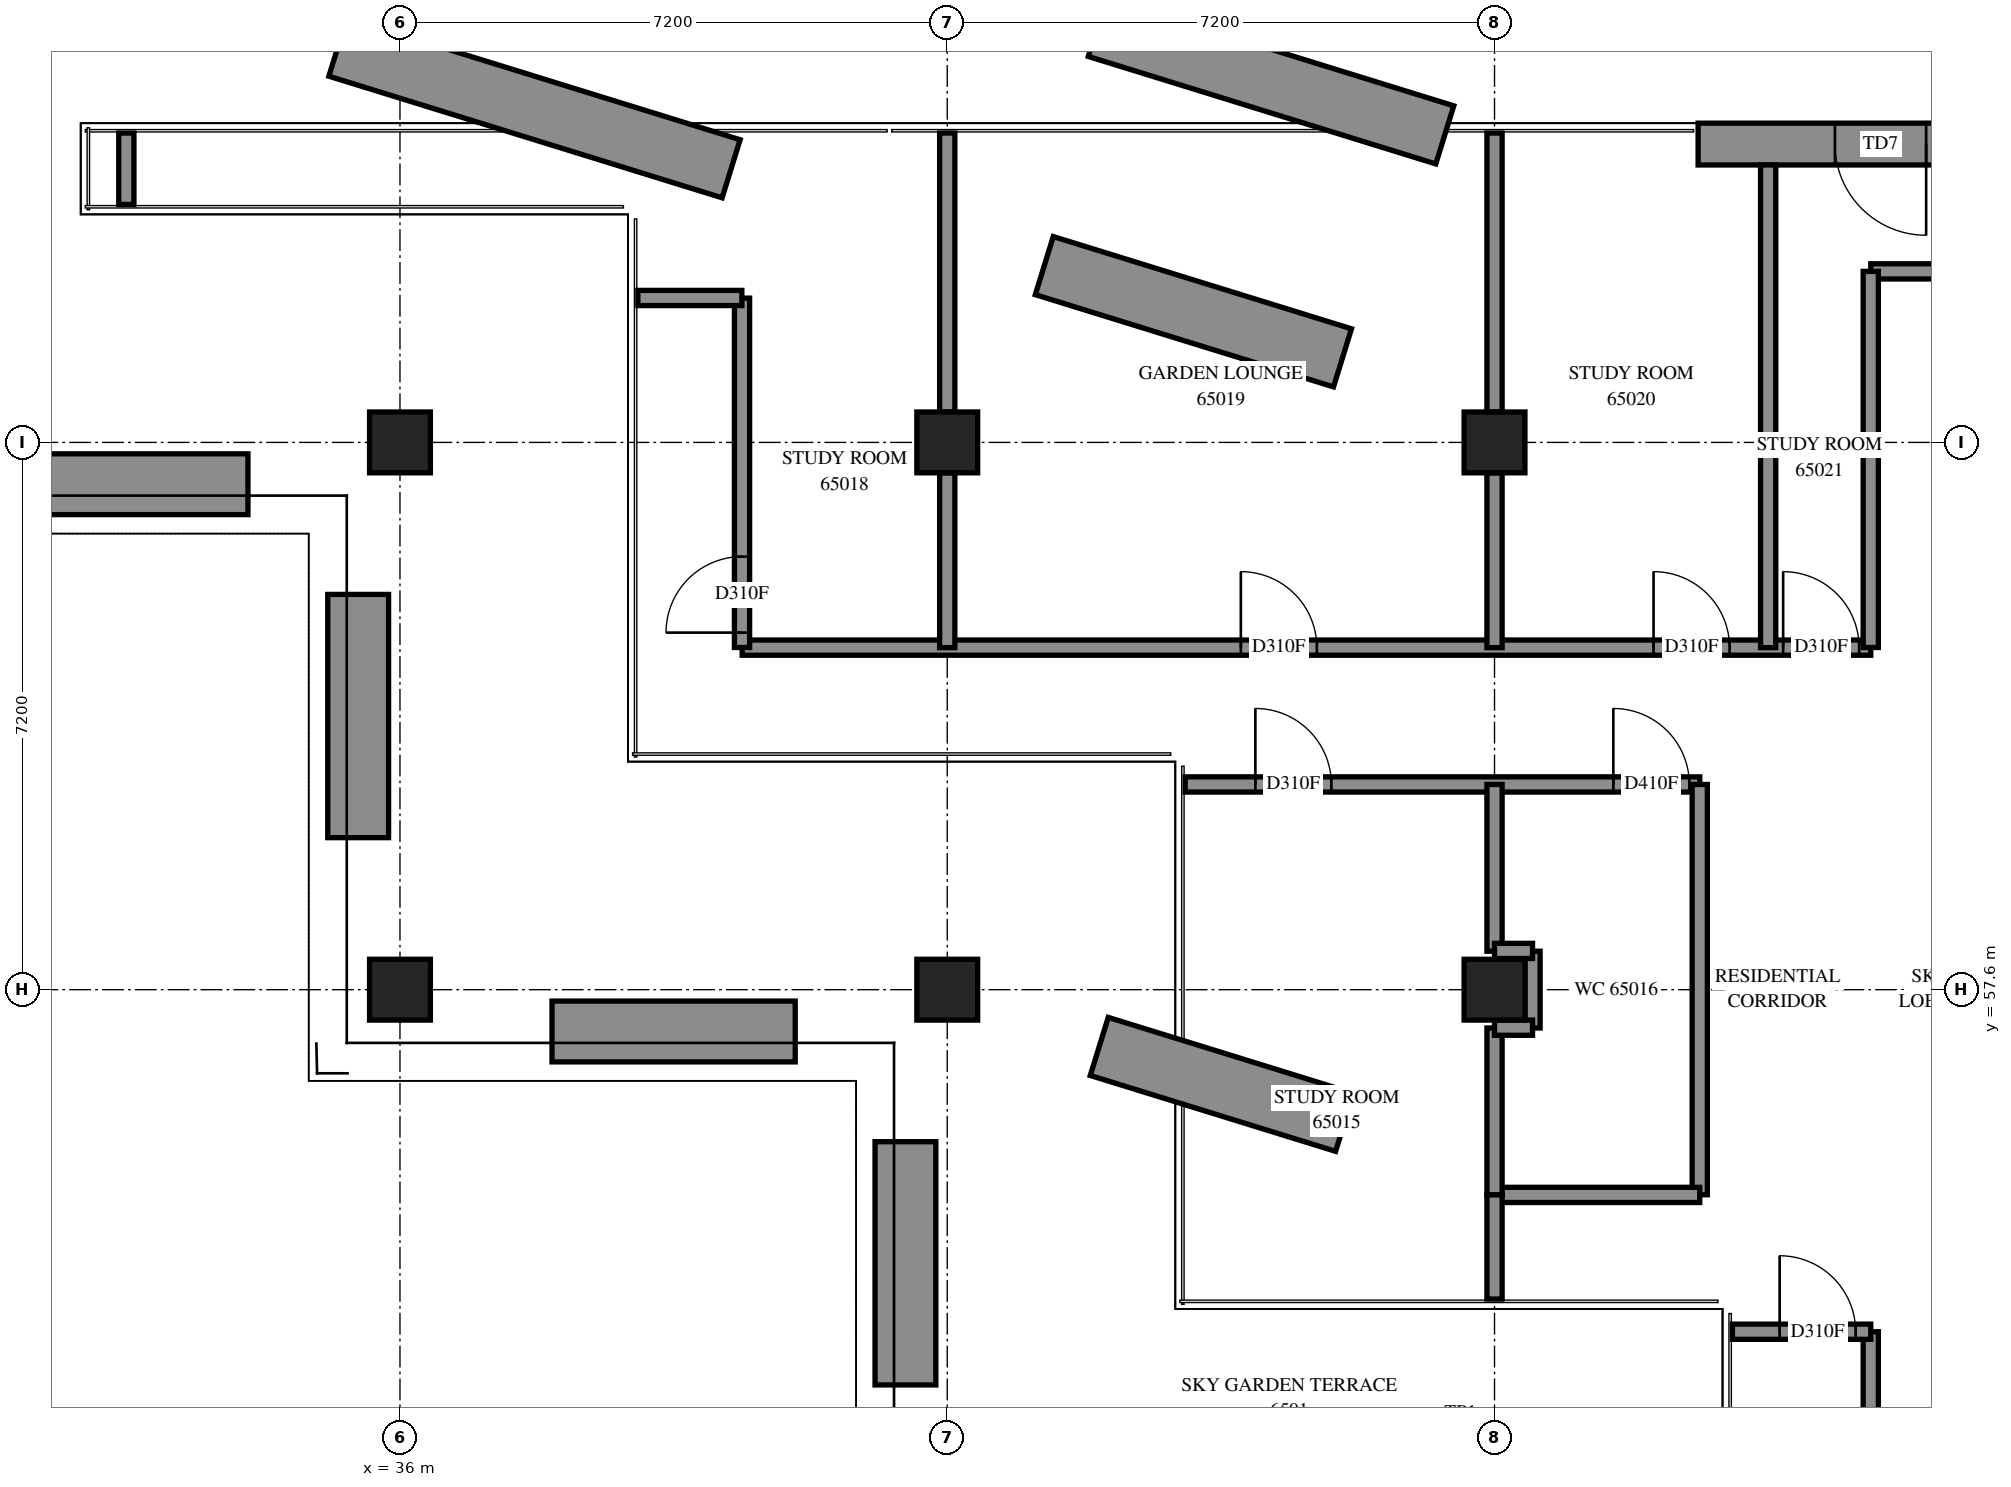
"""IFC4 building model, lengths in metres.
Left out: names, types, materials, properties, quantities, classifications, styles, units other than length and angle.
Written with IfcOpenShell. Run it as: python <this file> out.ifc"""

import sys

from ifc_helpers import new_model, si_unit, direction, frame, frame_2d, origin, origin_2d, place, context, subcontext, project, spatial, polyline, rectangle, outline, extrude, element, fill, save


model = new_model("IFC4")
c1 = context("Model", 3, precision=1e-05, world=origin(), true_north=direction((0.0, 1.0)))
c2 = subcontext(c1, "Body", "Model", "MODEL_VIEW")
j1 = project(units=[si_unit("LENGTHUNIT", "METRE"), si_unit("PLANEANGLEUNIT", "RADIAN")], contexts=[c1])
p1 = place(None, origin())
s1 = spatial("IfcSite", under=j1, at=p1, CompositionType="ELEMENT")
p2 = place(p1, origin())
s2 = spatial("IfcBuilding", under=s1, at=p2, CompositionType="ELEMENT")
p3 = place(p2, frame((0.0, 0.0, 239.6)))
s3 = spatial("IfcBuildingStorey", under=s2, at=p3, CompositionType="ELEMENT", Elevation=239.6)
for number, where, z_axis, x_axis in (
    (1, (36.0, 57.6, 0.0), (0.0, 0.0, 1.0), (1.0, 0.0, 0.0)),
    (2, (36.0, 64.8, 0.0), (0.0, 0.0, 1.0), (1.0, 0.0, 0.0)),
    (3, (43.2, 57.6, 0.0), (0.0, 0.0, 1.0), (1.0, 0.0, 0.0)),
    (4, (43.2, 64.8, 0.0), (0.0, 0.0, 1.0), (1.0, 0.0, 0.0)),
    (5, (50.4, 57.6, 0.0), (0.0, 0.0, 1.0), (1.0, 0.0, 0.0)),
    (6, (50.4, 64.8, 0.0), (0.0, 0.0, 1.0), (1.0, 0.0, 0.0)),
):
    element("IfcColumn", number, at=place(p3, frame(where, z_axis=z_axis, x_axis=x_axis)), inside=s3, PredefinedType="COLUMN", context=c2, shape_type="SweptSolid", body=[
        extrude(rectangle(XDim=0.8, YDim=0.8, at=origin_2d()), origin(), (0.0, 0.0, 1.0), 3.9),
    ])
p4 = place(p3, frame((56.678, 68.725, 0.0), z_axis=(0.0, 0.0, 1.0), x_axis=(-1.0, 0.0, 0.0)))
e7 = element("IfcWall", 7, at=p4, inside=s3, PredefinedType="SOLIDWALL", context=c2, shape_type="SweptSolid", body=[
    extrude(rectangle(XDim=3.6, YDim=0.55, at=frame_2d((1.8, 0.0))), origin(), (0.0, 0.0, 1.0), 3.9),
])
p5 = place(p4, frame((0.6, 0.0, 0.0)))
e8 = element("IfcOpeningElement", 8, at=p5, cuts=e7, PredefinedType="OPENING", context=c2, shape_type="SweptSolid", body=[
    extrude(rectangle(XDim=1.2, YDim=2.4, at=frame_2d((0.6, 1.2))), frame((0.0, 0.285, 0.0), z_axis=(0.0, -1.0, 0.0), x_axis=(1.0, 0.0, 0.0)), (0.0, 0.0, 1.0), 0.57),
])
for number, where, z_axis, x_axis in (
    (9, (30.8, 64.25, 0.0), (0.0, 0.0, 1.0), (1.0, 0.0, 0.0)),
    (10, (35.45, 62.8, 0.0), (0.0, 0.0, 1.0), (0.0, -1.0, 0.0)),
    (11, (38.0, 57.05, 0.0), (0.0, 0.0, 1.0), (1.0, 0.0, 0.0)),
    (12, (42.65, 55.6, 0.0), (0.0, 0.0, 1.0), (0.0, -1.0, 0.0)),
):
    element("IfcWall", number, at=place(p3, frame(where, z_axis=z_axis, x_axis=x_axis)), inside=s3, PredefinedType="SOLIDWALL", context=c2, shape_type="SweptSolid", body=[
        extrude(rectangle(XDim=3.2, YDim=0.8, at=frame_2d((1.6, 0.0))), origin(), (0.0, 0.0, 1.0), 0.65),
    ])
p6 = place(p3, frame((49.746, 68.846, 0.0), z_axis=(0.0, 0.0, 1.0), x_axis=(-0.9553559962, 0.2954571382, 0.0)))
e13 = element("IfcWall", 13, at=p6, inside=s3, PredefinedType="SOLIDWALL", context=c2, shape_type="SweptSolid", body=[
    extrude(rectangle(XDim=4.785, YDim=0.8, at=frame_2d((2.393, 0.0))), origin(), (0.0, 0.0, 1.0), 0.65),
])
p7 = place(p3, frame((48.4, 65.912, 0.0), z_axis=(0.0, 0.0, 1.0), x_axis=(-0.9553584107, 0.2954493308, 0.0)))
e14 = element("IfcWall", 14, at=p7, inside=s3, PredefinedType="SOLIDWALL", context=c2, shape_type="SweptSolid", body=[
    extrude(rectangle(XDim=4.107, YDim=0.8, at=frame_2d((2.053, 0.0))), origin(), (0.0, 0.0, 1.0), 0.65),
])
p8 = place(p3, frame((40.356, 68.4, 0.0), z_axis=(0.0, 0.0, 1.0), x_axis=(-0.9553596268, 0.2954453985, 0.0)))
e15 = element("IfcWall", 15, at=p8, inside=s3, PredefinedType="SOLIDWALL", context=c2, shape_type="SweptSolid", body=[
    extrude(rectangle(XDim=5.416, YDim=0.8, at=frame_2d((2.708, 0.0))), origin(), (0.0, 0.0, 1.0), 0.65),
])
p9 = place(p3, frame((55.35, 67.05, 0.0), z_axis=(0.0, 0.0, 1.0), x_axis=(1.0, 0.0, 0.0)))
e16 = element("IfcWall", 16, at=p9, inside=s3, PredefinedType="PARTITIONING", context=c2, shape_type="SweptSolid", body=[
    extrude(rectangle(XDim=18.9, YDim=0.2, at=frame_2d((9.45, 0.0))), origin(), (0.0, 0.0, 1.0), 3.9),
])
p10 = place(p9, frame((9.733, 0.0, 0.0)))
e17 = element("IfcOpeningElement", 17, at=p10, cuts=e16, PredefinedType="OPENING", context=c2, shape_type="SweptSolid", body=[
    extrude(rectangle(XDim=1.0, YDim=2.1, at=frame_2d((0.5, 1.05))), frame((0.0, 0.11, 0.0), z_axis=(0.0, -1.0, 0.0), x_axis=(1.0, 0.0, 0.0)), (0.0, 0.0, 1.0), 0.22),
])
p11 = place(p3, frame((40.502, 62.1, 0.0), z_axis=(0.0, 0.0, 1.0), x_axis=(1.0, 0.0, 0.0)))
e18 = element("IfcWall", 18, at=p11, inside=s3, PredefinedType="PARTITIONING", context=c2, shape_type="SweptSolid", body=[
    extrude(rectangle(XDim=14.848, YDim=0.2, at=frame_2d((7.424, 0.0))), origin(), (0.0, 0.0, 1.0), 3.9),
])
p12 = place(p11, frame((6.561, 0.0, 0.0)))
e19 = element("IfcOpeningElement", 19, at=p12, cuts=e18, PredefinedType="OPENING", context=c2, shape_type="SweptSolid", body=[
    extrude(rectangle(XDim=1.0, YDim=2.1, at=frame_2d((0.5, 1.05))), frame((0.0, 0.11, 0.0), z_axis=(0.0, -1.0, 0.0), x_axis=(1.0, 0.0, 0.0)), (0.0, 0.0, 1.0), 0.22),
])
p13 = place(p11, frame((11.991, 0.0, 0.0)))
e20 = element("IfcOpeningElement", 20, at=p13, cuts=e18, PredefinedType="OPENING", context=c2, shape_type="SweptSolid", body=[
    extrude(rectangle(XDim=1.0, YDim=2.1, at=frame_2d((0.5, 1.05))), frame((0.0, 0.11, 0.0), z_axis=(0.0, -1.0, 0.0), x_axis=(1.0, 0.0, 0.0)), (0.0, 0.0, 1.0), 0.22),
])
p14 = place(p11, frame((13.695, 0.0, 0.0)))
e21 = element("IfcOpeningElement", 21, at=p14, cuts=e18, PredefinedType="OPENING", context=c2, shape_type="SweptSolid", body=[
    extrude(rectangle(XDim=1.0, YDim=2.1, at=frame_2d((0.5, 1.05))), frame((0.0, 0.11, 0.0), z_axis=(0.0, -1.0, 0.0), x_axis=(1.0, 0.0, 0.0)), (0.0, 0.0, 1.0), 0.22),
])
p15 = place(p3, frame((46.33, 60.3, 0.0), z_axis=(0.0, 0.0, 1.0), x_axis=(1.0, 0.0, 0.0)))
e22 = element("IfcWall", 22, at=p15, inside=s3, PredefinedType="PARTITIONING", context=c2, shape_type="SweptSolid", body=[
    extrude(rectangle(XDim=6.77, YDim=0.2, at=frame_2d((3.385, 0.0))), origin(), (0.0, 0.0, 1.0), 3.9),
])
p16 = place(p15, frame((0.924, 0.0, 0.0)))
e23 = element("IfcOpeningElement", 23, at=p16, cuts=e22, PredefinedType="OPENING", context=c2, shape_type="SweptSolid", body=[
    extrude(rectangle(XDim=1.0, YDim=2.1, at=frame_2d((0.5, 1.05))), frame((0.0, 0.11, 0.0), z_axis=(0.0, -1.0, 0.0), x_axis=(1.0, 0.0, 0.0)), (0.0, 0.0, 1.0), 0.22),
])
p17 = place(p15, frame((5.633, 0.0, 0.0)))
e24 = element("IfcOpeningElement", 24, at=p17, cuts=e22, PredefinedType="OPENING", context=c2, shape_type="SweptSolid", body=[
    extrude(rectangle(XDim=1.0, YDim=2.1, at=frame_2d((0.5, 1.05))), frame((0.0, 0.11, 0.0), z_axis=(0.0, -1.0, 0.0), x_axis=(1.0, 0.0, 0.0)), (0.0, 0.0, 1.0), 0.22),
])
p18 = place(p3, frame((54.0, 62.1, 0.0), z_axis=(0.0, 0.0, 1.0), x_axis=(0.0, 1.0, 0.0)))
e25 = element("IfcWall", 25, at=p18, inside=s3, PredefinedType="PARTITIONING", context=c2, shape_type="SweptSolid", body=[
    extrude(rectangle(XDim=6.35, YDim=0.2, at=frame_2d((3.175, 0.0))), origin(), (0.0, 0.0, 1.0), 3.9),
])
p19 = place(p3, frame((53.1, 54.902, 0.0), z_axis=(0.0, 0.0, 1.0), x_axis=(0.0, 1.0, 0.0)))
e26 = element("IfcWall", 26, at=p19, inside=s3, PredefinedType="PARTITIONING", context=c2, shape_type="SweptSolid", body=[
    extrude(rectangle(XDim=5.398, YDim=0.2, at=frame_2d((2.699, 0.0))), origin(), (0.0, 0.0, 1.0), 3.9),
])
p20 = place(p3, frame((55.35, 48.15, 0.0), z_axis=(0.0, 0.0, 1.0), x_axis=(0.0, 1.0, 0.0)))
e27 = element("IfcWall", 27, at=p20, inside=s3, PredefinedType="PARTITIONING", context=c2, shape_type="SweptSolid", body=[
    extrude(rectangle(XDim=4.95, YDim=0.2, at=frame_2d((2.475, 0.0))), origin(), (0.0, 0.0, 1.0), 3.9),
])
p21 = place(p3, frame((55.35, 62.102, 0.0), z_axis=(0.0, 0.0, 1.0), x_axis=(0.0, 1.0, 0.0)))
e28 = element("IfcWall", 28, at=p21, inside=s3, PredefinedType="PARTITIONING", context=c2, shape_type="SweptSolid", body=[
    extrude(rectangle(XDim=4.948, YDim=0.2, at=frame_2d((2.474, 0.0))), origin(), (0.0, 0.0, 1.0), 3.9),
])
p22 = place(p3, frame((40.5, 62.102, 0.0), z_axis=(0.0, 0.0, 1.0), x_axis=(0.0, 1.0, 0.0)))
e29 = element("IfcWall", 29, at=p22, inside=s3, PredefinedType="PARTITIONING", context=c2, shape_type="SweptSolid", body=[
    extrude(rectangle(XDim=4.596, YDim=0.2, at=frame_2d((2.298, 0.0))), origin(), (0.0, 0.0, 1.0), 3.9),
])
p23 = place(p22, frame((0.196, 0.0, 0.0)))
e30 = element("IfcOpeningElement", 30, at=p23, cuts=e29, PredefinedType="OPENING", context=c2, shape_type="SweptSolid", body=[
    extrude(rectangle(XDim=1.0, YDim=2.1, at=frame_2d((0.5, 1.05))), frame((0.0, 0.11, 0.0), z_axis=(0.0, -1.0, 0.0), x_axis=(1.0, 0.0, 0.0)), (0.0, 0.0, 1.0), 0.22),
])
for number, where, z_axis, x_axis in (
    (31, (43.2, 65.2, 0.0), (0.0, 0.0, 1.0), (0.0, 1.0, 0.0)),
    (32, (50.4, 65.2, 0.0), (0.0, 0.0, 1.0), (0.0, 1.0, 0.0)),
):
    element("IfcWall", number, at=place(p3, frame(where, z_axis=z_axis, x_axis=x_axis)), inside=s3, PredefinedType="PARTITIONING", context=c2, shape_type="SweptSolid", body=[
        extrude(rectangle(XDim=3.67, YDim=0.2, at=frame_2d((1.835, 0.0))), origin(), (0.0, 0.0, 1.0), 3.9),
    ])
p24 = place(p3, frame((50.4, 54.9, 0.0), z_axis=(0.0, 0.0, 1.0), x_axis=(1.0, 0.0, 0.0)))
e33 = element("IfcWall", 33, at=p24, inside=s3, PredefinedType="PARTITIONING", context=c2, shape_type="SweptSolid", body=[
    extrude(rectangle(XDim=2.7, YDim=0.2, at=frame_2d((1.35, 0.0))), origin(), (0.0, 0.0, 1.0), 3.9),
])
for number, where, z_axis, x_axis in (
    (34, (43.2, 62.1, 0.0), (0.0, 0.0, 1.0), (0.0, 1.0, 0.0)),
    (35, (50.4, 62.1, 0.0), (0.0, 0.0, 1.0), (0.0, 1.0, 0.0)),
):
    element("IfcWall", number, at=place(p3, frame(where, z_axis=z_axis, x_axis=x_axis)), inside=s3, PredefinedType="PARTITIONING", context=c2, shape_type="SweptSolid", body=[
        extrude(rectangle(XDim=2.3, YDim=0.2, at=frame_2d((1.15, 0.0))), origin(), (0.0, 0.0, 1.0), 3.9),
    ])
p25 = place(p3, frame((50.4, 54.9, 0.0), z_axis=(0.0, 0.0, 1.0), x_axis=(0.0, 1.0, 0.0)))
e36 = element("IfcWall", 36, at=p25, inside=s3, PredefinedType="PARTITIONING", context=c2, shape_type="SweptSolid", body=[
    extrude(rectangle(XDim=2.196, YDim=0.2, at=frame_2d((1.098, 0.0))), origin(), (0.0, 0.0, 1.0), 3.9),
])
p26 = place(p3, frame((50.4, 58.106, 0.0), z_axis=(0.0, 0.0, 1.0), x_axis=(0.0, 1.0, 0.0)))
e37 = element("IfcWall", 37, at=p26, inside=s3, PredefinedType="PARTITIONING", context=c2, shape_type="SweptSolid", body=[
    extrude(rectangle(XDim=2.194, YDim=0.2, at=frame_2d((1.097, 0.0))), origin(), (0.0, 0.0, 1.0), 3.9),
])
p27 = place(p3, frame((53.53, 53.1, 0.0), z_axis=(0.0, 0.0, 1.0), x_axis=(1.0, 0.0, 0.0)))
e38 = element("IfcWall", 38, at=p27, inside=s3, PredefinedType="PARTITIONING", context=c2, shape_type="SweptSolid", body=[
    extrude(rectangle(XDim=1.82, YDim=0.2, at=frame_2d((0.91, 0.0))), origin(), (0.0, 0.0, 1.0), 3.9),
])
p28 = place(p27, frame((0.621, 0.0, 0.0)))
e39 = element("IfcOpeningElement", 39, at=p28, cuts=e38, PredefinedType="OPENING", context=c2, shape_type="SweptSolid", body=[
    extrude(rectangle(XDim=1.0, YDim=2.1, at=frame_2d((0.5, 1.05))), frame((0.0, 0.11, 0.0), z_axis=(0.0, -1.0, 0.0), x_axis=(1.0, 0.0, 0.0)), (0.0, 0.0, 1.0), 0.22),
])
p29 = place(p3, frame((50.4, 53.53, 0.0), z_axis=(0.0, 0.0, 1.0), x_axis=(0.0, 1.0, 0.0)))
e40 = element("IfcWall", 40, at=p29, inside=s3, PredefinedType="PARTITIONING", context=c2, shape_type="SweptSolid", body=[
    extrude(rectangle(XDim=1.37, YDim=0.2, at=frame_2d((0.685, 0.0))), origin(), (0.0, 0.0, 1.0), 3.9),
])
p30 = place(p3, frame((39.13, 66.7, 0.0), z_axis=(0.0, 0.0, 1.0), x_axis=(1.0, 0.0, 0.0)))
e41 = element("IfcWall", 41, at=p30, inside=s3, PredefinedType="PARTITIONING", context=c2, shape_type="SweptSolid", body=[
    extrude(rectangle(XDim=1.368, YDim=0.2, at=frame_2d((0.684, 0.0))), origin(), (0.0, 0.0, 1.0), 3.9),
])
p31 = place(p3, frame((50.9, 57.096, 0.0), z_axis=(0.0, 0.0, 1.0), x_axis=(0.0, 1.0, 0.0)))
e42 = element("IfcWall", 42, at=p31, inside=s3, PredefinedType="PARTITIONING", context=c2, shape_type="SweptSolid", body=[
    extrude(rectangle(XDim=1.01, YDim=0.2, at=frame_2d((0.505, 0.0))), origin(), (0.0, 0.0, 1.0), 3.9),
])
p32 = place(p3, frame((32.4, 67.93, 0.0), z_axis=(0.0, 0.0, 1.0), x_axis=(0.0, 1.0, 0.0)))
e43 = element("IfcWall", 43, at=p32, inside=s3, PredefinedType="PARTITIONING", context=c2, shape_type="SweptSolid", body=[
    extrude(rectangle(XDim=0.94, YDim=0.2, at=frame_2d((0.47, 0.0))), origin(), (0.0, 0.0, 1.0), 3.9),
])
for number, where, z_axis, x_axis in (
    (44, (50.4, 58.11, 0.0), (0.0, 0.0, 1.0), (1.0, 0.0, 0.0)),
    (45, (50.4, 57.1, 0.0), (0.0, 0.0, 1.0), (1.0, 0.0, 0.0)),
):
    element("IfcWall", number, at=place(p3, frame(where, z_axis=z_axis, x_axis=x_axis)), inside=s3, PredefinedType="PARTITIONING", context=c2, shape_type="SweptSolid", body=[
        extrude(rectangle(XDim=0.5, YDim=0.2, at=frame_2d((0.25, 0.0))), origin(), (0.0, 0.0, 1.0), 3.9),
    ])
p33 = place(p3, frame((48.427, 55.855, 0.0), z_axis=(0.0, 0.0, 1.0), x_axis=(-0.9553575309, 0.2954521756, 0.0)))
e46 = element("IfcWall", 46, at=p33, inside=s3, PredefinedType="SOLIDWALL", context=c2, shape_type="SweptSolid", body=[
    extrude(outline(polyline([(0.0, -0.4), (3.378, -0.4), (3.378, 0.4), (0.0, 0.4), (0.0, -0.4)])), origin(), (0.0, 0.0, 1.0), 0.65),
])
p34 = place(p5, origin())
e47 = element("IfcDoor", 47, at=p34, inside=s3, OperationType="SINGLE_SWING_LEFT", PredefinedType="DOOR", context=c2, shape_type="SweptSolid", body=[
    extrude(rectangle(XDim=1.2, YDim=2.4, at=frame_2d((0.6, 1.2))), frame((0.0, 0.025, 0.0), z_axis=(0.0, -1.0, 0.0), x_axis=(1.0, 0.0, 0.0)), (0.0, 0.0, 1.0), 0.05),
])
fill(e8, e47)
p35 = place(p28, origin())
e48 = element("IfcDoor", 48, at=p35, inside=s3, OperationType="SINGLE_SWING_RIGHT", PredefinedType="DOOR", context=c2, shape_type="SweptSolid", body=[
    extrude(rectangle(XDim=1.0, YDim=2.1, at=frame_2d((0.5, 1.05))), frame((0.0, 0.025, 0.0), z_axis=(0.0, -1.0, 0.0), x_axis=(1.0, 0.0, 0.0)), (0.0, 0.0, 1.0), 0.05),
])
fill(e39, e48)
p36 = place(p16, origin())
e49 = element("IfcDoor", 49, at=p36, inside=s3, OperationType="SINGLE_SWING_RIGHT", PredefinedType="DOOR", context=c2, shape_type="SweptSolid", body=[
    extrude(rectangle(XDim=1.0, YDim=2.1, at=frame_2d((0.5, 1.05))), frame((0.0, 0.025, 0.0), z_axis=(0.0, -1.0, 0.0), x_axis=(1.0, 0.0, 0.0)), (0.0, 0.0, 1.0), 0.05),
])
fill(e23, e49)
p37 = place(p17, origin())
e50 = element("IfcDoor", 50, at=p37, inside=s3, OperationType="SINGLE_SWING_LEFT", PredefinedType="DOOR", context=c2, shape_type="SweptSolid", body=[
    extrude(rectangle(XDim=1.0, YDim=2.1, at=frame_2d((0.5, 1.05))), frame((0.0, 0.025, 0.0), z_axis=(0.0, -1.0, 0.0), x_axis=(1.0, 0.0, 0.0)), (0.0, 0.0, 1.0), 0.05),
])
fill(e24, e50)
p38 = place(p23, origin())
e51 = element("IfcDoor", 51, at=p38, inside=s3, OperationType="SINGLE_SWING_LEFT", PredefinedType="DOOR", context=c2, shape_type="SweptSolid", body=[
    extrude(rectangle(XDim=1.0, YDim=2.1, at=frame_2d((0.5, 1.05))), frame((0.0, 0.025, 0.0), z_axis=(0.0, -1.0, 0.0), x_axis=(1.0, 0.0, 0.0)), (0.0, 0.0, 1.0), 0.05),
])
fill(e30, e51)
p39 = place(p12, origin())
e52 = element("IfcDoor", 52, at=p39, inside=s3, OperationType="SINGLE_SWING_RIGHT", PredefinedType="DOOR", context=c2, shape_type="SweptSolid", body=[
    extrude(rectangle(XDim=1.0, YDim=2.1, at=frame_2d((0.5, 1.05))), frame((0.0, 0.025, 0.0), z_axis=(0.0, -1.0, 0.0), x_axis=(1.0, 0.0, 0.0)), (0.0, 0.0, 1.0), 0.05),
])
fill(e19, e52)
p40 = place(p13, origin())
e53 = element("IfcDoor", 53, at=p40, inside=s3, OperationType="SINGLE_SWING_RIGHT", PredefinedType="DOOR", context=c2, shape_type="SweptSolid", body=[
    extrude(rectangle(XDim=1.0, YDim=2.1, at=frame_2d((0.5, 1.05))), frame((0.0, 0.025, 0.0), z_axis=(0.0, -1.0, 0.0), x_axis=(1.0, 0.0, 0.0)), (0.0, 0.0, 1.0), 0.05),
])
fill(e20, e53)
p41 = place(p14, origin())
e54 = element("IfcDoor", 54, at=p41, inside=s3, OperationType="SINGLE_SWING_LEFT", PredefinedType="DOOR", context=c2, shape_type="SweptSolid", body=[
    extrude(rectangle(XDim=1.0, YDim=2.1, at=frame_2d((0.5, 1.05))), frame((0.0, 0.025, 0.0), z_axis=(0.0, -1.0, 0.0), x_axis=(1.0, 0.0, 0.0)), (0.0, 0.0, 1.0), 0.05),
])
fill(e21, e54)
save(model, sys.argv[1])
